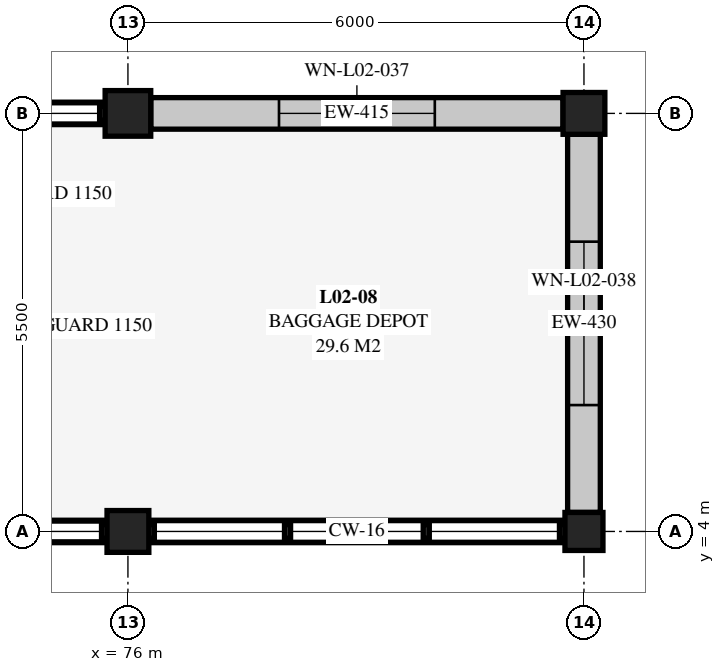
"""IFC4 building model, lengths in metres.
Left out: names, types, materials, properties, quantities, classifications, styles, units other than length and angle.
Written with IfcOpenShell. Run it as: python <this file> out.ifc"""

import sys

from ifc_helpers import new_model, si_unit, direction, frame, frame_2d, origin, origin_2d, place, context, subcontext, project, spatial, rectangle, extrude, element, fill, save


model = new_model("IFC4")
c1 = context("Model", 3, precision=1e-05, world=origin(), true_north=direction((0.0, 1.0)))
c2 = subcontext(c1, "Body", "Model", "MODEL_VIEW")
j1 = project(units=[si_unit("LENGTHUNIT", "METRE"), si_unit("PLANEANGLEUNIT", "RADIAN")], contexts=[c1])
p1 = place(None, origin())
s1 = spatial("IfcSite", under=j1, at=p1, CompositionType="ELEMENT")
p2 = place(p1, origin())
s2 = spatial("IfcBuilding", under=s1, at=p2, CompositionType="ELEMENT")
p3 = place(p2, frame((0.0, 0.0, 4.5)))
s3 = spatial("IfcBuildingStorey", under=s2, at=p3, CompositionType="ELEMENT", Elevation=4.5)
p4 = place(p3, frame((76.0, 4.0, 0.0), z_axis=(0.0, 0.0, 1.0), x_axis=(1.0, 0.0, 0.0)))
e1 = element("IfcColumn", 1, at=p4, inside=s3, PredefinedType="COLUMN", context=c2, shape_type="SweptSolid", body=[
    extrude(rectangle(XDim=0.55, YDim=0.55, at=origin_2d()), origin(), (0.0, 0.0, 1.0), 4.5),
])
p5 = place(p3, frame((76.0, 9.5, 0.0), z_axis=(0.0, 0.0, 1.0), x_axis=(1.0, 0.0, 0.0)))
e2 = element("IfcColumn", 2, at=p5, inside=s3, PredefinedType="COLUMN", context=c2, shape_type="SweptSolid", body=[
    extrude(rectangle(XDim=0.6, YDim=0.6, at=origin_2d()), origin(), (0.0, 0.0, 1.0), 4.5),
])
p6 = place(p3, frame((82.0, 4.0, 0.0), z_axis=(0.0, 0.0, 1.0), x_axis=(1.0, 0.0, 0.0)))
e3 = element("IfcColumn", 3, at=p6, inside=s3, PredefinedType="COLUMN", context=c2, shape_type="SweptSolid", body=[
    extrude(rectangle(XDim=0.5, YDim=0.5, at=origin_2d()), origin(), (0.0, 0.0, 1.0), 4.5),
])
p7 = place(p3, frame((82.0, 9.5, 0.0), z_axis=(0.0, 0.0, 1.0), x_axis=(1.0, 0.0, 0.0)))
e4 = element("IfcColumn", 4, at=p7, inside=s3, PredefinedType="COLUMN", context=c2, shape_type="SweptSolid", body=[
    extrude(rectangle(XDim=0.55, YDim=0.55, at=origin_2d()), origin(), (0.0, 0.0, 1.0), 4.5),
])
p8 = place(p3, frame((75.725, 4.0, 0.0), z_axis=(0.0, 0.0, 1.0), x_axis=(-1.0, 0.0, 0.0)))
e5 = element("IfcWall", 5, at=p8, inside=s3, PredefinedType="SOLIDWALL", context=c2, shape_type="SweptSolid", body=[
    extrude(rectangle(XDim=5.4, YDim=0.295, at=frame_2d((2.7, 0.0))), origin(), (0.0, 0.0, 1.0), 0.41),
])
p9 = place(p3, frame((70.25, 9.5, 0.0), z_axis=(0.0, 0.0, 1.0), x_axis=(1.0, 0.0, 0.0)))
e6 = element("IfcWall", 6, at=p9, inside=s3, PredefinedType="SOLIDWALL", context=c2, shape_type="SweptSolid", body=[
    extrude(rectangle(XDim=5.45, YDim=0.295, at=frame_2d((2.725, 0.0))), origin(), (0.0, 0.0, 1.0), 0.46),
])
p10 = place(p3, frame((81.75, 4.0, 0.0), z_axis=(0.0, 0.0, 1.0), x_axis=(-1.0, 0.0, 0.0)))
e7 = element("IfcWall", 7, at=p10, inside=s3, PredefinedType="SOLIDWALL", context=c2, shape_type="SweptSolid", body=[
    extrude(rectangle(XDim=5.475, YDim=0.295, at=frame_2d((2.738, 0.0))), origin(), (0.0, 0.0, 1.0), 0.52),
])
p11 = place(p3, frame((76.3, 9.5, 0.0), z_axis=(0.0, 0.0, 1.0), x_axis=(1.0, 0.0, 0.0)))
e8 = element("IfcWall", 8, at=p11, inside=s3, PredefinedType="SOLIDWALL", context=c2, shape_type="SweptSolid", body=[
    extrude(rectangle(XDim=5.425, YDim=0.415, at=frame_2d((2.712, 0.0))), origin(), (0.0, 0.0, 1.0), 3.857),
])
p12 = place(p11, frame((1.688, 0.0, 0.7)))
e9 = element("IfcOpeningElement", 9, at=p12, cuts=e8, PredefinedType="OPENING", context=c2, shape_type="SweptSolid", body=[
    extrude(rectangle(XDim=2.05, YDim=2.4, at=frame_2d((1.025, 1.2))), frame((0.0, 0.218, 0.0), z_axis=(0.0, -1.0, 0.0), x_axis=(1.0, 0.0, 0.0)), (0.0, 0.0, 1.0), 0.435),
])
p13 = place(p3, frame((82.0, 9.225, 0.0), z_axis=(0.0, 0.0, 1.0), x_axis=(0.0, -1.0, 0.0)))
e10 = element("IfcWall", 10, at=p13, inside=s3, PredefinedType="SOLIDWALL", context=c2, shape_type="SweptSolid", body=[
    extrude(rectangle(XDim=4.975, YDim=0.43, at=frame_2d((2.488, 0.0))), origin(), (0.0, 0.0, 1.0), 3.857),
])
p14 = place(p13, frame((1.413, 0.0, 0.7)))
e11 = element("IfcOpeningElement", 11, at=p14, cuts=e10, PredefinedType="OPENING", context=c2, shape_type="SweptSolid", body=[
    extrude(rectangle(XDim=2.15, YDim=2.4, at=frame_2d((1.075, 1.2))), frame((0.0, 0.225, 0.0), z_axis=(0.0, -1.0, 0.0), x_axis=(1.0, 0.0, 0.0)), (0.0, 0.0, 1.0), 0.45),
])
p15 = place(p12, origin())
e12 = element("IfcWindow", 12, at=p15, inside=s3, PartitioningType="SINGLE_PANEL", PredefinedType="WINDOW", context=c2, shape_type="SweptSolid", body=[
    extrude(rectangle(XDim=2.05, YDim=2.4, at=frame_2d((1.025, 1.2))), frame((0.0, 0.03, 0.0), z_axis=(0.0, -1.0, 0.0), x_axis=(1.0, 0.0, 0.0)), (0.0, 0.0, 1.0), 0.06),
])
fill(e9, e12)
p16 = place(p14, origin())
e13 = element("IfcWindow", 13, at=p16, inside=s3, PartitioningType="SINGLE_PANEL", PredefinedType="WINDOW", context=c2, shape_type="SweptSolid", body=[
    extrude(rectangle(XDim=2.15, YDim=2.4, at=frame_2d((1.075, 1.2))), frame((0.0, 0.03, 0.0), z_axis=(0.0, -1.0, 0.0), x_axis=(1.0, 0.0, 0.0)), (0.0, 0.0, 1.0), 0.06),
])
fill(e11, e13)
save(model, sys.argv[1])
